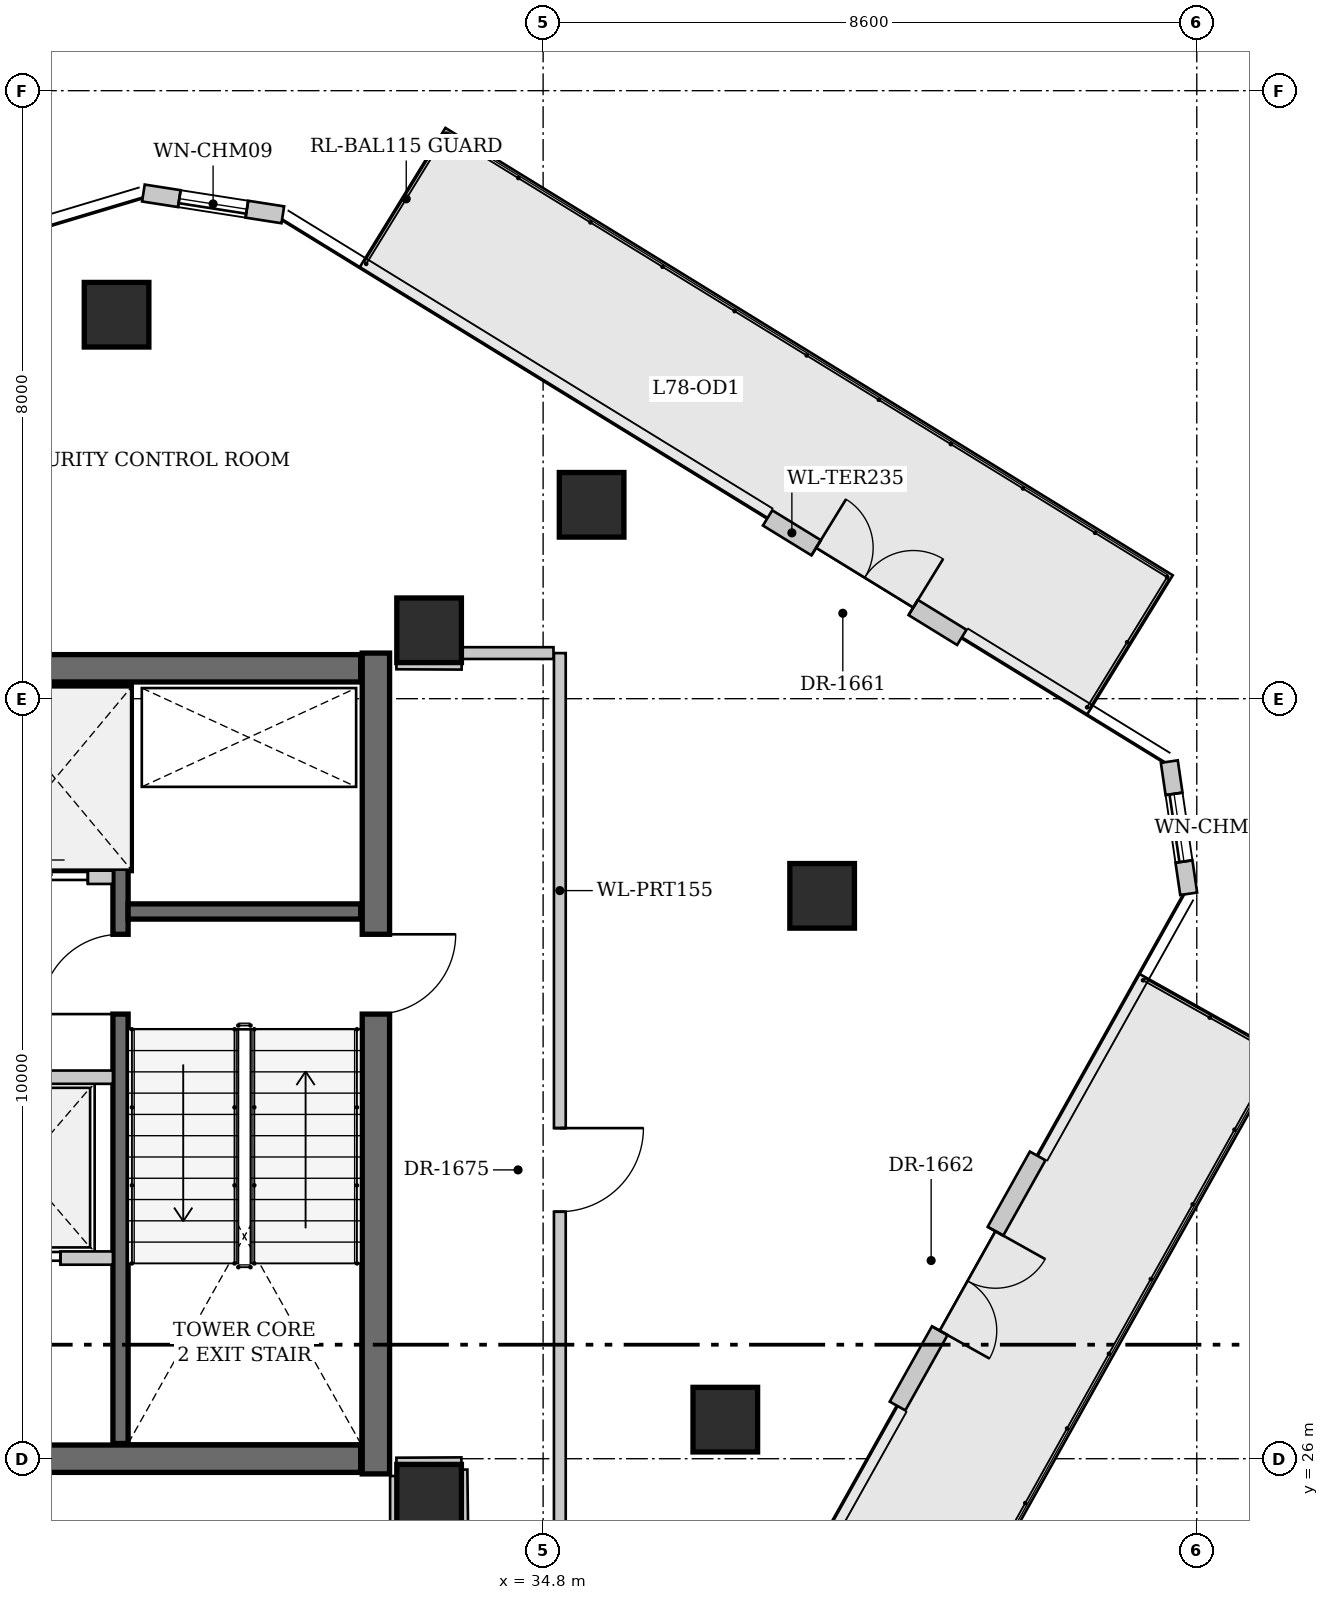
"""IFC4 building model, lengths in metres.
Left out: names, types, materials, properties, quantities, classifications, styles, units other than length and angle.
Written with IfcOpenShell. Run it as: python <this file> out.ifc"""

import sys

from ifc_helpers import new_model, si_unit, direction, frame, frame_2d, origin, origin_2d, place, context, subcontext, project, spatial, rectangle, extrude, source, transform, mapped, element, fill, save


model = new_model("IFC4")
c1 = context("Model", 3, precision=1e-05, world=origin(), true_north=direction((0.0, 1.0)))
c2 = subcontext(c1, "Body", "Model", "MODEL_VIEW")
j1 = project(units=[si_unit("LENGTHUNIT", "METRE"), si_unit("PLANEANGLEUNIT", "RADIAN")], contexts=[c1])
p1 = place(None, origin())
s1 = spatial("IfcSite", under=j1, at=p1, CompositionType="ELEMENT")
p2 = place(p1, origin())
s2 = spatial("IfcBuilding", under=s1, at=p2, CompositionType="ELEMENT")
p3 = place(p2, frame((0.0, 0.0, 291.8)))
s3 = spatial("IfcBuildingStorey", under=s2, at=p3, CompositionType="ELEMENT", Elevation=291.8)
for number, where, z_axis, x_axis in (
    (1, (29.188, 41.052, 0.0), (0.0, 0.0, 1.0), (1.0, 0.0, 0.0)),
    (2, (35.438, 38.551, 0.0), (0.0, 0.0, 1.0), (1.0, 0.0, 0.0)),
    (3, (38.471, 33.406, 0.0), (0.0, 0.0, 1.0), (1.0, 0.0, 0.0)),
    (4, (37.197, 26.514, 0.0), (0.0, 0.0, 1.0), (1.0, 0.0, 0.0)),
    (5, (33.3, 25.5, 0.0), (0.0, 0.0, 1.0), (1.0, 0.0, 0.0)),
    (6, (33.3, 36.9, 0.0), (0.0, 0.0, 1.0), (1.0, 0.0, 0.0)),
):
    element("IfcColumn", number, at=place(p3, frame(where, z_axis=z_axis, x_axis=x_axis)), inside=s3, PredefinedType="COLUMN", context=c2, shape_type="SweptSolid", body=[
        extrude(rectangle(XDim=0.85, YDim=0.85, at=origin_2d()), origin(), (0.0, 0.0, 1.0), 3.94),
    ])
p4 = place(p3, frame((29.541, 42.653, 0.0), z_axis=(0.0, 0.0, 1.0), x_axis=(0.988010153219, -0.154388915198, 0.0)))
e7 = element("IfcWall", 7, at=p4, inside=s3, PredefinedType="SOLIDWALL", context=c2, shape_type="SweptSolid", body=[
    extrude(rectangle(XDim=1.856, YDim=0.225, at=frame_2d((0.928, 0.0))), origin(), (0.0, 0.0, 1.0), 3.94),
])
p5 = place(p4, frame((0.478, 0.0, 0.9)))
e8 = element("IfcOpeningElement", 8, at=p5, cuts=e7, PredefinedType="OPENING", context=c2, shape_type="SweptSolid", body=[
    extrude(rectangle(XDim=0.9, YDim=1.85, at=frame_2d((0.45, 0.925))), frame((0.0, 0.123, 0.0), z_axis=(0.0, -1.0, 0.0), x_axis=(1.0, 0.0, 0.0)), (0.0, 0.0, 1.0), 0.245),
])
p6 = place(p3, frame((37.753, 38.378, 0.0), z_axis=(0.0, 0.0, 1.0), x_axis=(0.85176728672, -0.523920308133, 0.0)))
e9 = element("IfcWall", 9, at=p6, inside=s3, PredefinedType="SOLIDWALL", context=c2, shape_type="SweptSolid", body=[
    extrude(rectangle(XDim=3.0, YDim=0.235, at=frame_2d((1.5, 0.0))), origin(), (0.0, 0.0, 1.0), 3.94),
])
p7 = place(p6, frame((0.75, 0.0, 0.0)))
e10 = element("IfcOpeningElement", 10, at=p7, cuts=e9, PredefinedType="OPENING", context=c2, shape_type="SweptSolid", body=[
    extrude(rectangle(XDim=1.5, YDim=2.25, at=frame_2d((0.75, 1.125))), frame((0.0, 0.127, 0.0), z_axis=(0.0, -1.0, 0.0), x_axis=(1.0, 0.0, 0.0)), (0.0, 0.0, 1.0), 0.255),
])
p8 = place(p3, frame((43.039, 35.173, 0.0), z_axis=(0.0, 0.0, 1.0), x_axis=(0.144842288983, -0.98945475456, 0.0)))
e11 = element("IfcWall", 11, at=p8, inside=s3, PredefinedType="SOLIDWALL", context=c2, shape_type="SweptSolid", body=[
    extrude(rectangle(XDim=1.758, YDim=0.225, at=frame_2d((0.879, 0.0))), origin(), (0.0, 0.0, 1.0), 3.94),
])
p9 = place(p8, frame((0.429, 0.0, 0.9)))
e12 = element("IfcOpeningElement", 12, at=p9, cuts=e11, PredefinedType="OPENING", context=c2, shape_type="SweptSolid", body=[
    extrude(rectangle(XDim=0.9, YDim=1.85, at=frame_2d((0.45, 0.925))), frame((0.0, 0.123, 0.0), z_axis=(0.0, -1.0, 0.0), x_axis=(1.0, 0.0, 0.0)), (0.0, 0.0, 1.0), 0.245),
])
p10 = place(p3, frame((41.307, 29.984, 0.0), z_axis=(0.0, 0.0, 1.0), x_axis=(-0.488739356695, -0.87242984888, 0.0)))
e13 = element("IfcWall", 13, at=p10, inside=s3, PredefinedType="SOLIDWALL", context=c2, shape_type="SweptSolid", body=[
    extrude(rectangle(XDim=3.772, YDim=0.235, at=frame_2d((1.886, 0.0))), origin(), (0.0, 0.0, 1.0), 3.94),
])
p11 = place(p10, frame((1.136, 0.0, 0.0)))
e14 = element("IfcOpeningElement", 14, at=p11, cuts=e13, PredefinedType="OPENING", context=c2, shape_type="SweptSolid", body=[
    extrude(rectangle(XDim=1.5, YDim=2.25, at=frame_2d((0.75, 1.125))), frame((0.0, 0.127, 0.0), z_axis=(0.0, -1.0, 0.0), x_axis=(1.0, 0.0, 0.0)), (0.0, 0.0, 1.0), 0.255),
])
p12 = place(p3, frame((32.6, 36.6, 0.0), z_axis=(0.0, 0.0, 1.0), x_axis=(0.0, -1.0, 0.0)))
e15 = element("IfcWall", 15, at=p12, inside=s3, PredefinedType="SHEAR", context=c2, shape_type="SweptSolid", body=[
    extrude(rectangle(XDim=10.8, YDim=0.36, at=frame_2d((5.4, 0.0))), origin(), (0.0, 0.0, 1.0), 4.2),
])
p13 = place(p12, frame((3.7, 0.0, 0.0)))
e16 = element("IfcOpeningElement", 16, at=p13, cuts=e15, PredefinedType="OPENING", context=c2, shape_type="SweptSolid", body=[
    extrude(rectangle(XDim=1.05, YDim=2.15, at=frame_2d((0.525, 1.075))), frame((0.0, 0.19, 0.0), z_axis=(0.0, -1.0, 0.0), x_axis=(1.0, 0.0, 0.0)), (0.0, 0.0, 1.0), 0.38),
])
p14 = place(p3, frame((19.6, 36.4, 0.0), z_axis=(0.0, 0.0, 1.0), x_axis=(1.0, 0.0, 0.0)))
e17 = element("IfcWall", 17, at=p14, inside=s3, PredefinedType="SHEAR", context=c2, shape_type="SweptSolid", body=[
    extrude(rectangle(XDim=12.8, YDim=0.36, at=frame_2d((6.4, 0.0))), origin(), (0.0, 0.0, 1.0), 4.2),
])
p15 = place(p3, frame((32.4, 26.0, 0.0), z_axis=(0.0, 0.0, 1.0), x_axis=(-1.0, 0.0, 0.0)))
e18 = element("IfcWall", 18, at=p15, inside=s3, PredefinedType="SHEAR", context=c2, shape_type="SweptSolid", body=[
    extrude(rectangle(XDim=12.8, YDim=0.36, at=frame_2d((6.4, 0.0))), origin(), (0.0, 0.0, 1.0), 4.2),
])
p16 = place(p15, frame((10.75, 0.0, 0.0)))
e19 = element("IfcOpeningElement", 19, at=p16, cuts=e18, PredefinedType="OPENING", context=c2, shape_type="SweptSolid", body=[
    extrude(rectangle(XDim=1.05, YDim=2.15, at=frame_2d((0.525, 1.075))), frame((0.0, 0.19, 0.0), z_axis=(0.0, -1.0, 0.0), x_axis=(1.0, 0.0, 0.0)), (0.0, 0.0, 1.0), 0.38),
])
p17 = place(p15, frame((5.67, 0.0, 0.0)))
e20 = element("IfcOpeningElement", 20, at=p17, cuts=e18, PredefinedType="OPENING", context=c2, shape_type="SweptSolid", body=[
    extrude(rectangle(XDim=1.45, YDim=2.2, at=frame_2d((0.725, 1.1))), frame((0.0, 0.19, 0.0), z_axis=(0.0, -1.0, 0.0), x_axis=(1.0, 0.0, 0.0)), (0.0, 0.0, 1.0), 0.38),
])
p18 = place(p3, frame((29.24, 26.2, 0.0), z_axis=(0.0, 0.0, 1.0), x_axis=(0.0, 1.0, 0.0)))
e21 = element("IfcWall", 21, at=p18, inside=s3, PredefinedType="SHEAR", context=c2, shape_type="SweptSolid", body=[
    extrude(rectangle(XDim=10.0, YDim=0.2, at=frame_2d((5.0, 0.0))), origin(), (0.0, 0.0, 1.0), 4.2),
])
p19 = place(p18, frame((5.65, 0.0, 0.0)))
e22 = element("IfcOpeningElement", 22, at=p19, cuts=e21, PredefinedType="OPENING", context=c2, shape_type="SweptSolid", body=[
    extrude(rectangle(XDim=1.05, YDim=2.15, at=frame_2d((0.525, 1.075))), frame((0.0, 0.11, 0.0), z_axis=(0.0, -1.0, 0.0), x_axis=(1.0, 0.0, 0.0)), (0.0, 0.0, 1.0), 0.22),
])
p20 = place(p3, frame((29.34, 33.2, 0.0), z_axis=(0.0, 0.0, 1.0), x_axis=(1.0, 0.0, 0.0)))
e23 = element("IfcWall", 23, at=p20, inside=s3, PredefinedType="SHEAR", context=c2, shape_type="SweptSolid", body=[
    extrude(rectangle(XDim=3.06, YDim=0.2, at=frame_2d((1.53, 0.0))), origin(), (0.0, 0.0, 1.0), 4.2),
])
p21 = place(p3, frame((22.86, 33.65, 0.0), z_axis=(0.0, 0.0, 1.0), x_axis=(1.0, 0.0, 0.0)))
e24 = element("IfcWall", 24, at=p21, inside=s3, PredefinedType="SOLIDWALL", context=c2, shape_type="SweptSolid", body=[
    extrude(rectangle(XDim=6.28, YDim=0.175, at=frame_2d((3.14, 0.0))), origin(), (0.0, 0.0, 1.0), 3.94),
])
p22 = place(p21, frame((0.5, 0.0, 0.0)))
e25 = element("IfcOpeningElement", 25, at=p22, cuts=e24, PredefinedType="OPENING", context=c2, shape_type="SweptSolid", body=[
    extrude(rectangle(XDim=1.05, YDim=2.15, at=frame_2d((0.525, 1.075))), frame((0.0, 0.098, 0.0), z_axis=(0.0, -1.0, 0.0), x_axis=(1.0, 0.0, 0.0)), (0.0, 0.0, 1.0), 0.195),
])
p23 = place(p21, frame((2.76, 0.0, 0.0)))
e26 = element("IfcOpeningElement", 26, at=p23, cuts=e24, PredefinedType="OPENING", context=c2, shape_type="SweptSolid", body=[
    extrude(rectangle(XDim=1.05, YDim=2.15, at=frame_2d((0.525, 1.075))), frame((0.0, 0.098, 0.0), z_axis=(0.0, -1.0, 0.0), x_axis=(1.0, 0.0, 0.0)), (0.0, 0.0, 1.0), 0.195),
])
p24 = place(p21, frame((4.9, 0.0, 0.0)))
e27 = element("IfcOpeningElement", 27, at=p24, cuts=e24, PredefinedType="OPENING", context=c2, shape_type="SweptSolid", body=[
    extrude(rectangle(XDim=1.05, YDim=2.15, at=frame_2d((0.525, 1.075))), frame((0.0, 0.098, 0.0), z_axis=(0.0, -1.0, 0.0), x_axis=(1.0, 0.0, 0.0)), (0.0, 0.0, 1.0), 0.195),
])
p25 = place(p3, frame((22.86, 31.02, 0.0), z_axis=(0.0, 0.0, 1.0), x_axis=(1.0, 0.0, 0.0)))
e28 = element("IfcWall", 28, at=p25, inside=s3, PredefinedType="SOLIDWALL", context=c2, shape_type="SweptSolid", body=[
    extrude(rectangle(XDim=6.28, YDim=0.175, at=frame_2d((3.14, 0.0))), origin(), (0.0, 0.0, 1.0), 3.94),
])
p26 = place(p3, frame((26.95, 28.64, 0.0), z_axis=(0.0, 0.0, 1.0), x_axis=(1.0, 0.0, 0.0)))
e29 = element("IfcWall", 29, at=p26, inside=s3, PredefinedType="SOLIDWALL", context=c2, shape_type="SweptSolid", body=[
    extrude(rectangle(XDim=2.19, YDim=0.175, at=frame_2d((1.095, 0.0))), origin(), (0.0, 0.0, 1.0), 3.94),
])
p27 = place(p26, frame((0.45, 0.0, 0.0)))
e30 = element("IfcOpeningElement", 30, at=p27, cuts=e29, PredefinedType="OPENING", context=c2, shape_type="SweptSolid", body=[
    extrude(rectangle(XDim=1.05, YDim=2.15, at=frame_2d((0.525, 1.075))), frame((0.0, 0.098, 0.0), z_axis=(0.0, -1.0, 0.0), x_axis=(1.0, 0.0, 0.0)), (0.0, 0.0, 1.0), 0.195),
])
p28 = place(p3, frame((35.02, 36.6, 0.0), z_axis=(0.0, 0.0, 1.0), x_axis=(0.0, -1.0, 0.0)))
e31 = element("IfcWall", 31, at=p28, inside=s3, PredefinedType="PARTITIONING", context=c2, shape_type="SweptSolid", body=[
    extrude(rectangle(XDim=13.6, YDim=0.155, at=frame_2d((6.8, 0.0))), origin(), (0.0, 0.0, 1.0), 3.94),
])
p29 = place(p28, frame((6.25, 0.0, 0.0)))
e32 = element("IfcOpeningElement", 32, at=p29, cuts=e31, PredefinedType="OPENING", context=c2, shape_type="SweptSolid", body=[
    extrude(rectangle(XDim=1.1, YDim=2.2, at=frame_2d((0.55, 1.1))), frame((0.0, 0.087, 0.0), z_axis=(0.0, -1.0, 0.0), x_axis=(1.0, 0.0, 0.0)), (0.0, 0.0, 1.0), 0.175),
])
p30 = place(p3, frame((32.87, 36.465, 0.0), z_axis=(0.0, 0.0, 1.0), x_axis=(0.999986873463, -0.005123758532, 0.0)))
e33 = element("IfcWall", 33, at=p30, inside=s3, PredefinedType="PARTITIONING", context=c2, shape_type="SweptSolid", body=[
    extrude(rectangle(XDim=0.858, YDim=0.155, at=frame_2d((0.429, 0.0))), origin(), (0.0, 0.0, 1.0), 3.94),
])
p31 = place(p3, frame((33.74, 36.6, 0.0), z_axis=(0.0, 0.0, 1.0), x_axis=(1.0, 0.0, 0.0)))
e34 = element("IfcWall", 34, at=p31, inside=s3, PredefinedType="PARTITIONING", context=c2, shape_type="SweptSolid", body=[
    extrude(rectangle(XDim=1.197, YDim=0.155, at=frame_2d((0.598, 0.0))), origin(), (0.0, 0.0, 1.0), 3.94),
])
p32 = place(p3, frame((33.725, 25.94, 0.0), z_axis=(0.0, 0.0, 1.0), x_axis=(-0.999986790873, -0.005139852152, 0.0)))
e35 = element("IfcWall", 35, at=p32, inside=s3, PredefinedType="PARTITIONING", context=c2, shape_type="SweptSolid", body=[
    extrude(rectangle(XDim=0.855, YDim=0.155, at=frame_2d((0.427, 0.0))), origin(), (0.0, 0.0, 1.0), 3.94),
])
p33 = place(p3, frame((32.865, 25.773, 0.0), z_axis=(0.0, 0.0, 1.0), x_axis=(0.0, -1.0, 0.0)))
e36 = element("IfcWall", 36, at=p33, inside=s3, PredefinedType="PARTITIONING", context=c2, shape_type="SweptSolid", body=[
    extrude(rectangle(XDim=0.708, YDim=0.155, at=frame_2d((0.354, 0.0))), origin(), (0.0, 0.0, 1.0), 3.94),
])
p34 = place(p3, frame((33.735, 25.148, 0.0), z_axis=(0.0, 0.0, 1.0), x_axis=(-0.012059770759, 0.99992727832, 0.0)))
e37 = element("IfcWall", 37, at=p34, inside=s3, PredefinedType="PARTITIONING", context=c2, shape_type="SweptSolid", body=[
    extrude(rectangle(XDim=0.708, YDim=0.155, at=frame_2d((0.354, 0.0))), origin(), (0.0, 0.0, 1.0), 3.94),
])
m1 = source(origin(), c2, "Body", "SweptSolid", [
    extrude(rectangle(XDim=0.9, YDim=1.85, at=frame_2d((0.45, 0.925))), frame((0.0, 0.03, 0.0), z_axis=(0.0, -1.0, 0.0), x_axis=(1.0, 0.0, 0.0)), (0.0, 0.0, 1.0), 0.06),
])
p35 = place(p5, origin())
e38 = element("IfcWindow", 38, at=p35, inside=s3, PartitioningType="SINGLE_PANEL", PredefinedType="WINDOW", context=c2, shape_type="MappedRepresentation", body=[
    mapped(m1, transform((0.0, 0.0, 0.0), x_axis=(1.0, 0.0, 0.0), y_axis=(0.0, 1.0, 0.0), z_axis=(0.0, 0.0, 1.0), scale=1.0)),
])
fill(e8, e38)
m2 = source(origin(), c2, "Body", "SweptSolid", [
    extrude(rectangle(XDim=1.5, YDim=2.25, at=frame_2d((0.75, 1.125))), frame((0.0, 0.025, 0.0), z_axis=(0.0, -1.0, 0.0), x_axis=(1.0, 0.0, 0.0)), (0.0, 0.0, 1.0), 0.05),
])
p36 = place(p7, origin())
e39 = element("IfcDoor", 39, at=p36, inside=s3, OperationType="DOUBLE_DOOR_SINGLE_SWING", PredefinedType="DOOR", context=c2, shape_type="MappedRepresentation", body=[
    mapped(m2, transform((0.0, 0.0, 0.0), x_axis=(1.0, 0.0, 0.0), y_axis=(0.0, 1.0, 0.0), z_axis=(0.0, 0.0, 1.0), scale=1.0)),
])
fill(e10, e39)
p37 = place(p9, origin())
e40 = element("IfcWindow", 40, at=p37, inside=s3, PartitioningType="SINGLE_PANEL", PredefinedType="WINDOW", context=c2, shape_type="MappedRepresentation", body=[
    mapped(m1, transform((0.0, 0.0, 0.0), x_axis=(1.0, 0.0, 0.0), y_axis=(0.0, 1.0, 0.0), z_axis=(0.0, 0.0, 1.0), scale=1.0)),
])
fill(e12, e40)
p38 = place(p11, origin())
e41 = element("IfcDoor", 41, at=p38, inside=s3, OperationType="DOUBLE_DOOR_SINGLE_SWING", PredefinedType="DOOR", context=c2, shape_type="MappedRepresentation", body=[
    mapped(m2, transform((0.0, 0.0, 0.0), x_axis=(1.0, 0.0, 0.0), y_axis=(0.0, 1.0, 0.0), z_axis=(0.0, 0.0, 1.0), scale=1.0)),
])
fill(e14, e41)
m3 = source(origin(), c2, "Body", "SweptSolid", [
    extrude(rectangle(XDim=1.05, YDim=2.15, at=frame_2d((0.525, 1.075))), frame((0.0, 0.025, 0.0), z_axis=(0.0, -1.0, 0.0), x_axis=(1.0, 0.0, 0.0)), (0.0, 0.0, 1.0), 0.05),
])
p39 = place(p13, origin())
e42 = element("IfcDoor", 42, at=p39, inside=s3, OperationType="SINGLE_SWING_LEFT", PredefinedType="DOOR", context=c2, shape_type="MappedRepresentation", body=[
    mapped(m3, transform((0.0, 0.0, 0.0), x_axis=(1.0, 0.0, 0.0), y_axis=(0.0, 1.0, 0.0), z_axis=(0.0, 0.0, 1.0), scale=1.0)),
])
fill(e16, e42)
p40 = place(p19, origin())
e43 = element("IfcDoor", 43, at=p40, inside=s3, OperationType="SINGLE_SWING_LEFT", PredefinedType="DOOR", context=c2, shape_type="MappedRepresentation", body=[
    mapped(m3, transform((0.0, 0.0, 0.0), x_axis=(1.0, 0.0, 0.0), y_axis=(0.0, 1.0, 0.0), z_axis=(0.0, 0.0, 1.0), scale=1.0)),
])
fill(e22, e43)
m4 = source(origin(), c2, "Body", "SweptSolid", [
    extrude(rectangle(XDim=1.05, YDim=2.15, at=frame_2d((0.525, 1.075))), frame((0.0, 0.025, 0.0), z_axis=(0.0, -1.0, 0.0), x_axis=(1.0, 0.0, 0.0)), (0.0, 0.0, 1.0), 0.05),
])
p41 = place(p24, origin())
e44 = element("IfcDoor", 44, at=p41, inside=s3, OperationType="SLIDING_TO_LEFT", PredefinedType="DOOR", context=c2, shape_type="MappedRepresentation", body=[
    mapped(m4, transform((0.0, 0.0, 0.0), x_axis=(1.0, 0.0, 0.0), y_axis=(0.0, 1.0, 0.0), z_axis=(0.0, 0.0, 1.0), scale=1.0)),
])
fill(e27, e44)
p42 = place(p27, origin())
e45 = element("IfcDoor", 45, at=p42, inside=s3, OperationType="SLIDING_TO_LEFT", PredefinedType="DOOR", context=c2, shape_type="MappedRepresentation", body=[
    mapped(m4, transform((0.0, 0.0, 0.0), x_axis=(1.0, 0.0, 0.0), y_axis=(0.0, 1.0, 0.0), z_axis=(0.0, 0.0, 1.0), scale=1.0)),
])
fill(e30, e45)
m5 = source(origin(), c2, "Body", "SweptSolid", [
    extrude(rectangle(XDim=1.1, YDim=2.2, at=frame_2d((0.55, 1.1))), frame((0.0, 0.025, 0.0), z_axis=(0.0, -1.0, 0.0), x_axis=(1.0, 0.0, 0.0)), (0.0, 0.0, 1.0), 0.05),
])
p43 = place(p29, origin())
e46 = element("IfcDoor", 46, at=p43, inside=s3, OperationType="SINGLE_SWING_LEFT", PredefinedType="DOOR", context=c2, shape_type="MappedRepresentation", body=[
    mapped(m5, transform((0.0, 0.0, 0.0), x_axis=(1.0, 0.0, 0.0), y_axis=(0.0, 1.0, 0.0), z_axis=(0.0, 0.0, 1.0), scale=1.0)),
])
fill(e32, e46)
save(model, sys.argv[1])
